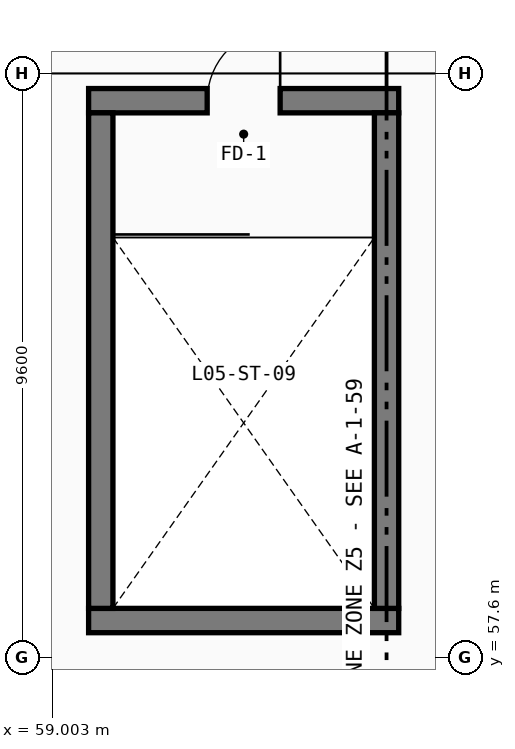
"""IFC4 building model, lengths in metres.
Left out: names, types, materials, properties, quantities, classifications, styles, units other than length and angle.
Written with IfcOpenShell. Run it as: python <this file> out.ifc"""

import sys

from ifc_helpers import new_model, si_unit, direction, frame, frame_2d, origin, place, context, subcontext, project, spatial, rectangle, extrude, element, fill, save


model = new_model("IFC4")
c1 = context("Model", 3, precision=1e-05, world=origin(), true_north=direction((0.0, 1.0)))
c2 = subcontext(c1, "Body", "Model", "MODEL_VIEW")
j1 = project(units=[si_unit("LENGTHUNIT", "METRE"), si_unit("PLANEANGLEUNIT", "RADIAN")], contexts=[c1])
p1 = place(None, origin())
s1 = spatial("IfcSite", under=j1, at=p1, CompositionType="ELEMENT")
p2 = place(p1, origin())
s2 = spatial("IfcBuilding", under=s1, at=p2, CompositionType="ELEMENT")
p3 = place(p2, frame((0.0, 0.0, 23.1)))
s3 = spatial("IfcBuildingStorey", under=s2, at=p3, CompositionType="ELEMENT", Elevation=23.1)
p4 = place(p3, frame((59.6, 58.2, 0.0), z_axis=(0.0, 0.0, 1.0), x_axis=(1.0, 0.0, 0.0)))
e1 = element("IfcWall", 1, at=p4, inside=s3, PredefinedType="SHEAR", context=c2, shape_type="SweptSolid", body=[
    extrude(rectangle(XDim=5.1, YDim=0.4, at=frame_2d((2.55, 0.0))), origin(), (0.0, 0.0, 1.0), 4.82),
])
p5 = place(p3, frame((64.7, 66.75, 0.0), z_axis=(0.0, 0.0, 1.0), x_axis=(-1.0, 0.0, 0.0)))
e2 = element("IfcWall", 2, at=p5, inside=s3, PredefinedType="SHEAR", context=c2, shape_type="SweptSolid", body=[
    extrude(rectangle(XDim=5.1, YDim=0.4, at=frame_2d((2.55, 0.0))), origin(), (0.0, 0.0, 1.0), 4.82),
])
p6 = place(p5, frame((3.15, 0.0, 0.0), z_axis=(0.0, 0.0, 1.0), x_axis=(-1.0, 0.0, 0.0)))
e3 = element("IfcOpeningElement", 3, at=p6, cuts=e2, PredefinedType="OPENING", context=c2, shape_type="SweptSolid", body=[
    extrude(rectangle(XDim=1.2, YDim=2.2, at=frame_2d((0.6, 1.1))), frame((0.0, 0.21, 0.0), z_axis=(0.0, -1.0, 0.0), x_axis=(1.0, 0.0, 0.0)), (0.0, 0.0, 1.0), 0.42),
])
for number, where, z_axis, x_axis in (
    (4, (59.8, 66.55, 0.0), (0.0, 0.0, 1.0), (0.0, -1.0, 0.0)),
    (5, (64.5, 58.4, 0.0), (0.0, 0.0, 1.0), (0.0, 1.0, 0.0)),
):
    element("IfcWall", number, at=place(p3, frame(where, z_axis=z_axis, x_axis=x_axis)), inside=s3, PredefinedType="SHEAR", context=c2, shape_type="SweptSolid", body=[
        extrude(rectangle(XDim=8.15, YDim=0.4, at=frame_2d((4.075, 0.0))), origin(), (0.0, 0.0, 1.0), 4.82),
    ])
p7 = place(p6, origin())
e6 = element("IfcDoor", 6, at=p7, inside=s3, OperationType="SINGLE_SWING_RIGHT", PredefinedType="DOOR", context=c2, shape_type="SweptSolid", body=[
    extrude(rectangle(XDim=1.2, YDim=2.2, at=frame_2d((0.6, 1.1))), frame((0.0, 0.025, 0.0), z_axis=(0.0, -1.0, 0.0), x_axis=(1.0, 0.0, 0.0)), (0.0, 0.0, 1.0), 0.05),
])
fill(e3, e6)
save(model, sys.argv[1])
